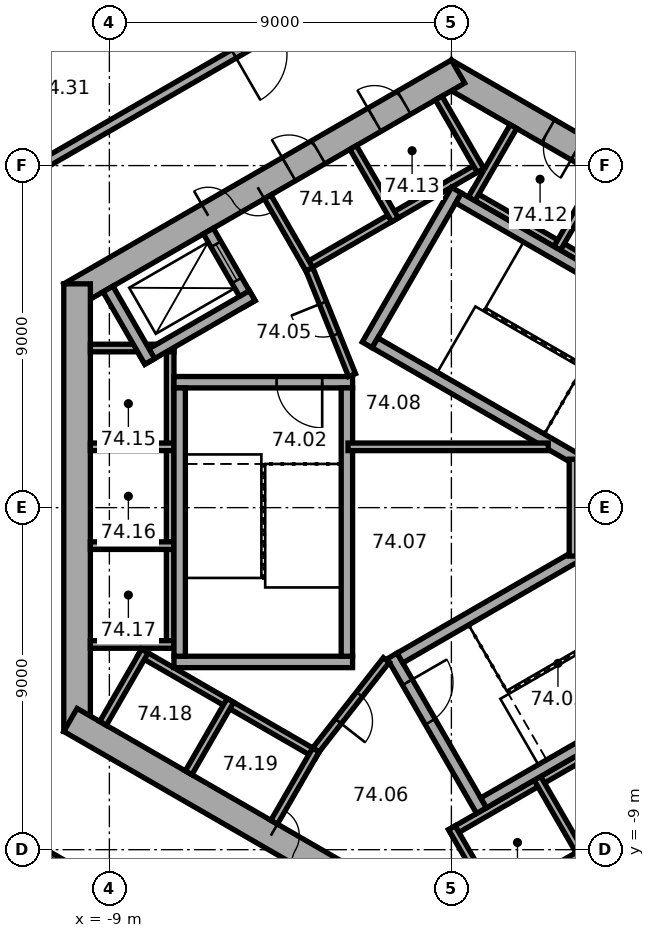
"""IFC4 building model, lengths in metres.
Left out: names, types, materials, properties, quantities, classifications, styles, units other than length and angle.
Written with IfcOpenShell. Run it as: python <this file> out.ifc"""

import sys

from ifc_helpers import new_model, si_unit, direction, frame, frame_2d, origin, place, context, subcontext, project, spatial, rectangle, extrude, element, fill, save


model = new_model("IFC4")
c1 = context("Model", 3, precision=1e-05, world=origin(), true_north=direction((0.0, 1.0)))
c2 = subcontext(c1, "Body", "Model", "MODEL_VIEW")
j1 = project(units=[si_unit("LENGTHUNIT", "METRE"), si_unit("PLANEANGLEUNIT", "RADIAN")], contexts=[c1])
p1 = place(None, origin())
s1 = spatial("IfcSite", under=j1, at=p1, CompositionType="ELEMENT")
p2 = place(p1, origin())
s2 = spatial("IfcBuilding", under=s1, at=p2, CompositionType="ELEMENT")
p3 = place(p2, frame((0.0, 0.0, 300.5)))
s3 = spatial("IfcBuildingStorey", under=s2, at=p3, CompositionType="ELEMENT", Elevation=300.5)
p4 = place(p3, frame((10.025, 5.586, 0.0), z_axis=(0.0, 0.0, 1.0), x_axis=(-0.866026453023, 0.499998182661, 0.0)))
e1 = element("IfcWall", 1, at=p4, inside=s3, PredefinedType="SHEAR", context=c2, shape_type="SweptSolid", body=[
    extrude(rectangle(XDim=11.778, YDim=0.7, at=frame_2d((5.889, 0.0))), origin(), (0.0, 0.0, 1.0), 4.5),
])
p5 = place(p4, frame((3.839, 0.0, 0.0)))
e2 = element("IfcOpeningElement", 2, at=p5, cuts=e1, PredefinedType="OPENING", context=c2, shape_type="SweptSolid", body=[
    extrude(rectangle(XDim=0.9, YDim=2.1, at=frame_2d((0.45, 1.05))), frame((0.0, 0.36, 0.0), z_axis=(0.0, -1.0, 0.0), x_axis=(1.0, 0.0, 0.0)), (0.0, 0.0, 1.0), 0.72),
])
p6 = place(p4, frame((7.739, 0.0, 0.0)))
e3 = element("IfcOpeningElement", 3, at=p6, cuts=e1, PredefinedType="OPENING", context=c2, shape_type="SweptSolid", body=[
    extrude(rectangle(XDim=0.9, YDim=2.1, at=frame_2d((0.45, 1.05))), frame((0.0, 0.36, 0.0), z_axis=(0.0, -1.0, 0.0), x_axis=(1.0, 0.0, 0.0)), (0.0, 0.0, 1.0), 0.72),
])
p7 = place(p3, frame((0.175, 11.475, 0.0), z_axis=(0.0, 0.0, 1.0), x_axis=(-0.866026453023, -0.499998182661, 0.0)))
e4 = element("IfcWall", 4, at=p7, inside=s3, PredefinedType="SHEAR", context=c2, shape_type="SweptSolid", body=[
    extrude(rectangle(XDim=11.778, YDim=0.7, at=frame_2d((5.889, 0.0))), origin(), (0.0, 0.0, 1.0), 4.5),
])
p8 = place(p7, frame((6.089, 0.0, 0.0)))
e5 = element("IfcOpeningElement", 5, at=p8, cuts=e4, PredefinedType="OPENING", context=c2, shape_type="SweptSolid", body=[
    extrude(rectangle(XDim=1.5, YDim=2.1, at=frame_2d((0.75, 1.05))), frame((0.0, 0.36, 0.0), z_axis=(0.0, -1.0, 0.0), x_axis=(1.0, 0.0, 0.0)), (0.0, 0.0, 1.0), 0.72),
])
p9 = place(p7, frame((1.639, 0.0, 0.0)))
e6 = element("IfcOpeningElement", 6, at=p9, cuts=e4, PredefinedType="OPENING", context=c2, shape_type="SweptSolid", body=[
    extrude(rectangle(XDim=0.9, YDim=2.1, at=frame_2d((0.45, 1.05))), frame((0.0, 0.36, 0.0), z_axis=(0.0, -1.0, 0.0), x_axis=(1.0, 0.0, 0.0)), (0.0, 0.0, 1.0), 0.72),
])
p10 = place(p7, frame((4.239, 0.0, 0.0)))
e7 = element("IfcOpeningElement", 7, at=p10, cuts=e4, PredefinedType="OPENING", context=c2, shape_type="SweptSolid", body=[
    extrude(rectangle(XDim=0.9, YDim=2.1, at=frame_2d((0.45, 1.05))), frame((0.0, 0.36, 0.0), z_axis=(0.0, -1.0, 0.0), x_axis=(1.0, 0.0, 0.0)), (0.0, 0.0, 1.0), 0.72),
])
p11 = place(p3, frame((-9.85, 5.889, 0.0), z_axis=(0.0, 0.0, 1.0), x_axis=(0.0, -1.0, 0.0)))
e8 = element("IfcWall", 8, at=p11, inside=s3, PredefinedType="SHEAR", context=c2, shape_type="SweptSolid", body=[
    extrude(rectangle(XDim=11.778, YDim=0.7, at=frame_2d((5.889, 0.0))), origin(), (0.0, 0.0, 1.0), 4.5),
])
p12 = place(p3, frame((-10.025, -5.586, 0.0), z_axis=(0.0, 0.0, 1.0), x_axis=(0.866026453023, -0.499998182661, 0.0)))
e9 = element("IfcWall", 9, at=p12, inside=s3, PredefinedType="SHEAR", context=c2, shape_type="SweptSolid", body=[
    extrude(rectangle(XDim=11.778, YDim=0.7, at=frame_2d((5.889, 0.0))), origin(), (0.0, 0.0, 1.0), 4.5),
])
p13 = place(p12, frame((6.089, 0.0, 0.0)))
e10 = element("IfcOpeningElement", 10, at=p13, cuts=e9, PredefinedType="OPENING", context=c2, shape_type="SweptSolid", body=[
    extrude(rectangle(XDim=1.5, YDim=2.1, at=frame_2d((0.75, 1.05))), frame((0.0, 0.36, 0.0), z_axis=(0.0, -1.0, 0.0), x_axis=(1.0, 0.0, 0.0)), (0.0, 0.0, 1.0), 0.72),
])
p14 = place(p3, frame((-0.175, -11.475, 0.0), z_axis=(0.0, 0.0, 1.0), x_axis=(0.866026453023, 0.499998182661, 0.0)))
e11 = element("IfcWall", 11, at=p14, inside=s3, PredefinedType="SHEAR", context=c2, shape_type="SweptSolid", body=[
    extrude(rectangle(XDim=11.778, YDim=0.7, at=frame_2d((5.889, 0.0))), origin(), (0.0, 0.0, 1.0), 4.5),
])
p15 = place(p14, frame((7.639, 0.0, 0.0)))
e12 = element("IfcOpeningElement", 12, at=p15, cuts=e11, PredefinedType="OPENING", context=c2, shape_type="SweptSolid", body=[
    extrude(rectangle(XDim=1.1, YDim=2.1, at=frame_2d((0.55, 1.05))), frame((0.0, 0.36, 0.0), z_axis=(0.0, -1.0, 0.0), x_axis=(1.0, 0.0, 0.0)), (0.0, 0.0, 1.0), 0.72),
])
p16 = place(p3, frame((-2.624, 20.713, 0.0), z_axis=(0.0, 0.0, 1.0), x_axis=(-0.866026460444, -0.499998169808, 0.0)))
e13 = element("IfcWall", 13, at=p16, inside=s3, PredefinedType="STANDARD", context=c2, shape_type="SweptSolid", body=[
    extrude(rectangle(XDim=17.731, YDim=0.2, at=frame_2d((8.866, 0.0))), origin(), (0.0, 0.0, 1.0), 4.5),
])
p17 = place(p3, frame((7.424, 4.259, 0.0), z_axis=(0.0, 0.0, 1.0), x_axis=(-0.866026010844, 0.49999894854, 0.0)))
e14 = element("IfcWall", 14, at=p17, inside=s3, PredefinedType="PARTITIONING", context=c2, shape_type="SweptSolid", body=[
    extrude(rectangle(XDim=8.0, YDim=0.2, at=frame_2d((4.0, 0.0))), origin(), (0.0, 0.0, 1.0), 4.2),
])
for number, where, z_axis, x_axis in (
    (15, (2.784, 6.822, 0.0), (0.0, 0.0, 1.0), (0.5, 0.866, 0.0)),
    (16, (0.532, 8.122, 0.0), (0.0, 0.0, 1.0), (0.5, 0.866, 0.0)),
):
    element("IfcWall", number, at=place(p3, frame(where, z_axis=z_axis, x_axis=x_axis)), inside=s3, PredefinedType="PARTITIONING", context=c2, shape_type="SweptSolid", body=[
        extrude(rectangle(XDim=2.2, YDim=0.2, at=frame_2d((1.1, 0.0))), origin(), (0.0, 0.0, 1.0), 4.2),
    ])
p18 = place(p3, frame((0.803, 9.009, 0.0), z_axis=(0.0, 0.0, 1.0), x_axis=(-0.866028230842, -0.499995103361, 0.0)))
e17 = element("IfcWall", 17, at=p18, inside=s3, PredefinedType="PARTITIONING", context=c2, shape_type="SweptSolid", body=[
    extrude(rectangle(XDim=5.4, YDim=0.2, at=frame_2d((2.7, 0.0))), origin(), (0.0, 0.0, 1.0), 4.2),
])
p19 = place(p3, frame((0.767, 8.872, 0.0), z_axis=(0.0, 0.0, 1.0), x_axis=(-0.499994660107, 0.866028486751, 0.0)))
e18 = element("IfcWall", 18, at=p19, inside=s3, PredefinedType="PARTITIONING", context=c2, shape_type="SweptSolid", body=[
    extrude(rectangle(XDim=2.2, YDim=0.2, at=frame_2d((1.1, 0.0))), origin(), (0.0, 0.0, 1.0), 4.2),
])
for number, where, z_axis, x_axis in (
    (19, (-1.485, 7.572, 0.0), (0.0, 0.0, 1.0), (-0.5, 0.866, 0.0)),
    (20, (-3.737, 6.272, 0.0), (0.0, 0.0, 1.0), (-0.5, 0.866, 0.0)),
):
    element("IfcWall", number, at=place(p3, frame(where, z_axis=z_axis, x_axis=x_axis)), inside=s3, PredefinedType="PARTITIONING", context=c2, shape_type="SweptSolid", body=[
        extrude(rectangle(XDim=2.2, YDim=0.2, at=frame_2d((1.1, 0.0))), origin(), (0.0, 0.0, 1.0), 4.2),
    ])
p20 = place(p3, frame((-7.4, 4.3, 0.0), z_axis=(0.0, 0.0, 1.0), x_axis=(0.0, -1.0, 0.0)))
e21 = element("IfcWall", 21, at=p20, inside=s3, PredefinedType="PARTITIONING", context=c2, shape_type="SweptSolid", body=[
    extrude(rectangle(XDim=8.0, YDim=0.2, at=frame_2d((4.0, 0.0))), origin(), (0.0, 0.0, 1.0), 4.2),
])
for number, where, z_axis, x_axis in (
    (22, (-7.3, 4.2, 0.0), (0.0, 0.0, 1.0), (-1.0, 0.0, 0.0)),
    (23, (-7.3, 1.6, 0.0), (0.0, 0.0, 1.0), (-1.0, 0.0, 0.0)),
    (24, (-7.3, -1.0, 0.0), (0.0, 0.0, 1.0), (-1.0, 0.0, 0.0)),
    (25, (-7.3, -3.6, 0.0), (0.0, 0.0, 1.0), (-1.0, 0.0, 0.0)),
):
    element("IfcWall", number, at=place(p3, frame(where, z_axis=z_axis, x_axis=x_axis)), inside=s3, PredefinedType="PARTITIONING", context=c2, shape_type="SweptSolid", body=[
        extrude(rectangle(XDim=2.2, YDim=0.2, at=frame_2d((1.1, 0.0))), origin(), (0.0, 0.0, 1.0), 4.2),
    ])
p21 = place(p3, frame((-8.203, -3.809, 0.0), z_axis=(0.0, 0.0, 1.0), x_axis=(0.866028230842, -0.499995103361, 0.0)))
e26 = element("IfcWall", 26, at=p21, inside=s3, PredefinedType="PARTITIONING", context=c2, shape_type="SweptSolid", body=[
    extrude(rectangle(XDim=5.4, YDim=0.2, at=frame_2d((2.7, 0.0))), origin(), (0.0, 0.0, 1.0), 4.2),
])
for number, where, z_axis, x_axis in (
    (27, (-8.067, -3.772, 0.0), (0.0, 0.0, 1.0), (-0.5, -0.866, 0.0)),
    (28, (-5.815, -5.072, 0.0), (0.0, 0.0, 1.0), (-0.5, -0.866, 0.0)),
):
    element("IfcWall", number, at=place(p3, frame(where, z_axis=z_axis, x_axis=x_axis)), inside=s3, PredefinedType="PARTITIONING", context=c2, shape_type="SweptSolid", body=[
        extrude(rectangle(XDim=2.2, YDim=0.2, at=frame_2d((1.1, 0.0))), origin(), (0.0, 0.0, 1.0), 4.2),
    ])
p22 = place(p3, frame((-3.563, -6.372, 0.0), z_axis=(0.0, 0.0, 1.0), x_axis=(-0.499994660107, -0.866028486751, 0.0)))
e29 = element("IfcWall", 29, at=p22, inside=s3, PredefinedType="PARTITIONING", context=c2, shape_type="SweptSolid", body=[
    extrude(rectangle(XDim=2.2, YDim=0.2, at=frame_2d((1.1, 0.0))), origin(), (0.0, 0.0, 1.0), 4.2),
])
p23 = place(p3, frame((-0.024, -8.559, 0.0), z_axis=(0.0, 0.0, 1.0), x_axis=(0.866026010844, 0.49999894854, 0.0)))
e30 = element("IfcWall", 30, at=p23, inside=s3, PredefinedType="PARTITIONING", context=c2, shape_type="SweptSolid", body=[
    extrude(rectangle(XDim=8.0, YDim=0.2, at=frame_2d((4.0, 0.0))), origin(), (0.0, 0.0, 1.0), 4.2),
])
for number, where, z_axis, x_axis in (
    (31, (0.013, -8.422, 0.0), (0.0, 0.0, 1.0), (0.5, -0.866, 0.0)),
    (32, (2.264, -7.122, 0.0), (0.0, 0.0, 1.0), (0.5, -0.866, 0.0)),
):
    element("IfcWall", number, at=place(p3, frame(where, z_axis=z_axis, x_axis=x_axis)), inside=s3, PredefinedType="PARTITIONING", context=c2, shape_type="SweptSolid", body=[
        extrude(rectangle(XDim=2.2, YDim=0.2, at=frame_2d((1.1, 0.0))), origin(), (0.0, 0.0, 1.0), 4.2),
    ])
p24 = place(p3, frame((-2.216, 4.282, 0.0), z_axis=(0.0, 0.0, 1.0), x_axis=(0.499977259774, 0.866038532462, 0.0)))
e33 = element("IfcWall", 33, at=p24, inside=s3, PredefinedType="SHEAR", context=c2, shape_type="SweptSolid", body=[
    extrude(rectangle(XDim=4.7, YDim=0.3, at=frame_2d((2.35, 0.0))), origin(), (0.0, 0.0, 1.0), 4.5),
])
for number, where, z_axis, x_axis in (
    (34, (4.103, 0.807, 0.0), (0.0, 0.0, 1.0), (-0.866, 0.5, 0.0)),
    (35, (6.303, 4.617, 0.0), (0.0, 0.0, 1.0), (-0.866, 0.5, 0.0)),
):
    element("IfcWall", number, at=place(p3, frame(where, z_axis=z_axis, x_axis=x_axis)), inside=s3, PredefinedType="SHEAR", context=c2, shape_type="SweptSolid", body=[
        extrude(rectangle(XDim=7.06, YDim=0.3, at=frame_2d((3.53, 0.0))), origin(), (0.0, 0.0, 1.0), 4.5),
    ])
p25 = place(p3, frame((-2.6, 3.3, 0.0), z_axis=(0.0, 0.0, 1.0), x_axis=(-1.0, 0.0, 0.0)))
e36 = element("IfcWall", 36, at=p25, inside=s3, PredefinedType="SHEAR", context=c2, shape_type="SweptSolid", body=[
    extrude(rectangle(XDim=4.7, YDim=0.3, at=frame_2d((2.35, 0.0))), origin(), (0.0, 0.0, 1.0), 4.5),
])
p26 = place(p25, frame((0.8, 0.0, 0.0)))
e37 = element("IfcOpeningElement", 37, at=p26, cuts=e36, PredefinedType="OPENING", context=c2, shape_type="SweptSolid", body=[
    extrude(rectangle(XDim=1.2, YDim=2.1, at=frame_2d((0.6, 1.05))), frame((0.0, 0.16, 0.0), z_axis=(0.0, -1.0, 0.0), x_axis=(1.0, 0.0, 0.0)), (0.0, 0.0, 1.0), 0.32),
])
p27 = place(p3, frame((-2.6, -4.06, 0.0), z_axis=(0.0, 0.0, 1.0), x_axis=(-1.0, 0.0, 0.0)))
e38 = element("IfcWall", 38, at=p27, inside=s3, PredefinedType="SHEAR", context=c2, shape_type="SweptSolid", body=[
    extrude(rectangle(XDim=4.7, YDim=0.3, at=frame_2d((2.35, 0.0))), origin(), (0.0, 0.0, 1.0), 4.5),
])
for number, where, z_axis, x_axis in (
    (39, (-2.75, 3.15, 0.0), (0.0, 0.0, 1.0), (0.0, -1.0, 0.0)),
    (40, (-7.15, 3.15, 0.0), (0.0, 0.0, 1.0), (0.0, -1.0, 0.0)),
):
    element("IfcWall", number, at=place(p3, frame(where, z_axis=z_axis, x_axis=x_axis)), inside=s3, PredefinedType="SHEAR", context=c2, shape_type="SweptSolid", body=[
        extrude(rectangle(XDim=7.06, YDim=0.3, at=frame_2d((3.53, 0.0))), origin(), (0.0, 0.0, 1.0), 4.5),
    ])
p28 = place(p3, frame((-1.558, -3.902, 0.0), z_axis=(0.0, 0.0, 1.0), x_axis=(0.499977259774, -0.866038532462, 0.0)))
e41 = element("IfcWall", 41, at=p28, inside=s3, PredefinedType="SHEAR", context=c2, shape_type="SweptSolid", body=[
    extrude(rectangle(XDim=4.7, YDim=0.3, at=frame_2d((2.35, 0.0))), origin(), (0.0, 0.0, 1.0), 4.5),
])
p29 = place(p28, frame((0.8, 0.0, 0.0)))
e42 = element("IfcOpeningElement", 42, at=p29, cuts=e41, PredefinedType="OPENING", context=c2, shape_type="SweptSolid", body=[
    extrude(rectangle(XDim=1.2, YDim=2.1, at=frame_2d((0.6, 1.05))), frame((0.0, 0.16, 0.0), z_axis=(0.0, -1.0, 0.0), x_axis=(1.0, 0.0, 0.0)), (0.0, 0.0, 1.0), 0.32),
])
for number, where, z_axis, x_axis in (
    (43, (-1.353, -3.957, 0.0), (0.0, 0.0, 1.0), (0.866, 0.5, 0.0)),
    (44, (0.847, -7.767, 0.0), (0.0, 0.0, 1.0), (0.866, 0.5, 0.0)),
):
    element("IfcWall", number, at=place(p3, frame(where, z_axis=z_axis, x_axis=x_axis)), inside=s3, PredefinedType="SHEAR", context=c2, shape_type="SweptSolid", body=[
        extrude(rectangle(XDim=7.06, YDim=0.3, at=frame_2d((3.53, 0.0))), origin(), (0.0, 0.0, 1.0), 4.5),
    ])
p30 = place(p3, frame((-5.295, 5.372, 0.0), z_axis=(0.0, 0.0, 1.0), x_axis=(-0.500077893725, 0.86598042715, 0.0)))
e45 = element("IfcWall", 45, at=p30, inside=s3, PredefinedType="SHEAR", context=c2, shape_type="SweptSolid", body=[
    extrude(rectangle(XDim=2.2, YDim=0.3, at=frame_2d((1.1, 0.0))), origin(), (0.0, 0.0, 1.0), 4.2),
])
p31 = place(p30, frame((0.7, 0.0, 0.0)))
e46 = element("IfcOpeningElement", 46, at=p31, cuts=e45, PredefinedType="OPENING", context=c2, shape_type="SweptSolid", body=[
    extrude(rectangle(XDim=1.1, YDim=2.1, at=frame_2d((0.55, 1.05))), frame((0.0, 0.16, 0.0), z_axis=(0.0, -1.0, 0.0), x_axis=(1.0, 0.0, 0.0)), (0.0, 0.0, 1.0), 0.32),
])
p32 = place(p3, frame((-5.24, 5.577, 0.0), z_axis=(0.0, 0.0, 1.0), x_axis=(-0.866014461049, -0.500018952895, 0.0)))
e47 = element("IfcWall", 47, at=p32, inside=s3, PredefinedType="SHEAR", context=c2, shape_type="SweptSolid", body=[
    extrude(rectangle(XDim=3.35, YDim=0.3, at=frame_2d((1.675, 0.0))), origin(), (0.0, 0.0, 1.0), 4.2),
])
p33 = place(p3, frame((-7.937, 3.847, 0.0), z_axis=(0.0, 0.0, 1.0), x_axis=(-0.50002983664, 0.866008176907, 0.0)))
e48 = element("IfcWall", 48, at=p33, inside=s3, PredefinedType="SHEAR", context=c2, shape_type="SweptSolid", body=[
    extrude(rectangle(XDim=2.2, YDim=0.3, at=frame_2d((1.1, 0.0))), origin(), (0.0, 0.0, 1.0), 4.2),
])
p34 = place(p3, frame((-2.615, 3.487, 0.0), z_axis=(0.0, 0.0, 1.0), x_axis=(-0.373576831041, 0.92759924068, 0.0)))
e49 = element("IfcWall", 49, at=p34, inside=s3, PredefinedType="PARTITIONING", context=c2, shape_type="SweptSolid", body=[
    extrude(rectangle(XDim=3.002, YDim=0.2, at=frame_2d((1.501, 0.0))), origin(), (0.0, 0.0, 1.0), 4.2),
])
p35 = place(p34, frame((1.15, 0.0, 0.0)))
e50 = element("IfcOpeningElement", 50, at=p35, cuts=e49, PredefinedType="OPENING", context=c2, shape_type="SweptSolid", body=[
    extrude(rectangle(XDim=0.9, YDim=2.1, at=frame_2d((0.45, 1.05))), frame((0.0, 0.11, 0.0), z_axis=(0.0, -1.0, 0.0), x_axis=(1.0, 0.0, 0.0)), (0.0, 0.0, 1.0), 0.22),
])
p36 = place(p3, frame((-1.712, -4.008, 0.0), z_axis=(0.0, 0.0, 1.0), x_axis=(-0.616549420702, -0.787316208287, 0.0)))
e51 = element("IfcWall", 51, at=p36, inside=s3, PredefinedType="PARTITIONING", context=c2, shape_type="SweptSolid", body=[
    extrude(rectangle(XDim=3.002, YDim=0.2, at=frame_2d((1.501, 0.0))), origin(), (0.0, 0.0, 1.0), 4.2),
])
p37 = place(p36, frame((1.15, 0.0, 0.0)))
e52 = element("IfcOpeningElement", 52, at=p37, cuts=e51, PredefinedType="OPENING", context=c2, shape_type="SweptSolid", body=[
    extrude(rectangle(XDim=0.9, YDim=2.1, at=frame_2d((0.45, 1.05))), frame((0.0, 0.11, 0.0), z_axis=(0.0, -1.0, 0.0), x_axis=(1.0, 0.0, 0.0)), (0.0, 0.0, 1.0), 0.22),
])
p38 = place(p3, frame((-2.72, 1.6, 0.0), z_axis=(0.0, 0.0, 1.0), x_axis=(1.0, 0.0, 0.0)))
e53 = element("IfcWall", 53, at=p38, inside=s3, PredefinedType="PARTITIONING", context=c2, shape_type="SweptSolid", body=[
    extrude(rectangle(XDim=5.269, YDim=0.2, at=frame_2d((2.634, 0.0))), origin(), (0.0, 0.0, 1.0), 4.2),
])
p39 = place(p3, frame((3.2, -1.275, 0.0), z_axis=(0.0, 0.0, 1.0), x_axis=(0.0, 1.0, 0.0)))
e54 = element("IfcWall", 54, at=p39, inside=s3, PredefinedType="PARTITIONING", context=c2, shape_type="SweptSolid", body=[
    extrude(rectangle(XDim=2.549, YDim=0.2, at=frame_2d((1.275, 0.0))), origin(), (0.0, 0.0, 1.0), 4.2),
])
p40 = place(p3, frame((-13.148, -7.651, 0.0), z_axis=(0.0, 0.0, 1.0), x_axis=(0.866016920268, -0.500014693593, 0.0)))
e55 = element("IfcWall", 55, at=p40, inside=s3, PredefinedType="PARTITIONING", context=c2, shape_type="SweptSolid", body=[
    extrude(rectangle(XDim=9.16, YDim=0.15, at=frame_2d((4.58, 0.0))), origin(), (0.0, 0.0, 1.0), 4.2),
])
p41 = place(p40, frame((0.55, 0.0, 0.0)))
e56 = element("IfcOpeningElement", 56, at=p41, cuts=e55, PredefinedType="OPENING", context=c2, shape_type="SweptSolid", body=[
    extrude(rectangle(XDim=1.0, YDim=2.1, at=frame_2d((0.5, 1.05))), frame((0.0, 0.085, 0.0), z_axis=(0.0, -1.0, 0.0), x_axis=(1.0, 0.0, 0.0)), (0.0, 0.0, 1.0), 0.17),
])
p42 = place(p3, frame((-12.14, 8.233, 0.0), z_axis=(0.0, 0.0, 1.0), x_axis=(0.866012216201, 0.500022840869, 0.0)))
e57 = element("IfcWall", 57, at=p42, inside=s3, PredefinedType="SOLIDWALL", context=c2, shape_type="SweptSolid", body=[
    extrude(rectangle(XDim=9.357, YDim=0.25, at=frame_2d((4.678, 0.0))), origin(), (0.0, 0.0, 1.0), 4.2),
])
p43 = place(p42, frame((7.407, 0.0, 0.0)))
e58 = element("IfcOpeningElement", 58, at=p43, cuts=e57, PredefinedType="OPENING", context=c2, shape_type="SweptSolid", body=[
    extrude(rectangle(XDim=1.4, YDim=2.1, at=frame_2d((0.7, 1.05))), frame((0.0, 0.135, 0.0), z_axis=(0.0, -1.0, 0.0), x_axis=(1.0, 0.0, 0.0)), (0.0, 0.0, 1.0), 0.27),
])
p44 = place(p3, frame((-16.187, 10.977, 0.0), z_axis=(0.0, 0.0, 1.0), x_axis=(0.866022320763, 0.500005339912, 0.0)))
e59 = element("IfcWall", 59, at=p44, inside=s3, PredefinedType="SOLIDWALL", context=c2, shape_type="SweptSolid", body=[
    extrude(rectangle(XDim=12.476, YDim=0.25, at=frame_2d((6.238, 0.0))), origin(), (0.0, 0.0, 1.0), 4.2),
])
p45 = place(p8, origin())
e60 = element("IfcDoor", 60, at=p45, inside=s3, OperationType="DOUBLE_DOOR_SINGLE_SWING", PredefinedType="DOOR", context=c2, shape_type="SweptSolid", body=[
    extrude(rectangle(XDim=1.5, YDim=2.1, at=frame_2d((0.75, 1.05))), frame((0.0, 0.025, 0.0), z_axis=(0.0, -1.0, 0.0), x_axis=(1.0, 0.0, 0.0)), (0.0, 0.0, 1.0), 0.05),
])
fill(e5, e60)
p46 = place(p13, origin())
e61 = element("IfcDoor", 61, at=p46, inside=s3, OperationType="DOUBLE_DOOR_SINGLE_SWING", PredefinedType="DOOR", context=c2, shape_type="SweptSolid", body=[
    extrude(rectangle(XDim=1.5, YDim=2.1, at=frame_2d((0.75, 1.05))), frame((0.0, 0.025, 0.0), z_axis=(0.0, -1.0, 0.0), x_axis=(1.0, 0.0, 0.0)), (0.0, 0.0, 1.0), 0.05),
])
fill(e10, e61)
p47 = place(p26, origin())
e62 = element("IfcDoor", 62, at=p47, inside=s3, OperationType="SINGLE_SWING_RIGHT", PredefinedType="DOOR", context=c2, shape_type="SweptSolid", body=[
    extrude(rectangle(XDim=1.2, YDim=2.1, at=frame_2d((0.6, 1.05))), frame((0.0, 0.025, 0.0), z_axis=(0.0, -1.0, 0.0), x_axis=(1.0, 0.0, 0.0)), (0.0, 0.0, 1.0), 0.05),
])
fill(e37, e62)
p48 = place(p29, origin())
e63 = element("IfcDoor", 63, at=p48, inside=s3, OperationType="SINGLE_SWING_RIGHT", PredefinedType="DOOR", context=c2, shape_type="SweptSolid", body=[
    extrude(rectangle(XDim=1.2, YDim=2.1, at=frame_2d((0.6, 1.05))), frame((0.0, 0.025, 0.0), z_axis=(0.0, -1.0, 0.0), x_axis=(1.0, 0.0, 0.0)), (0.0, 0.0, 1.0), 0.05),
])
fill(e42, e63)
p49 = place(p35, origin())
e64 = element("IfcDoor", 64, at=p49, inside=s3, OperationType="SINGLE_SWING_LEFT", PredefinedType="DOOR", context=c2, shape_type="SweptSolid", body=[
    extrude(rectangle(XDim=0.9, YDim=2.1, at=frame_2d((0.45, 1.05))), frame((0.0, 0.025, 0.0), z_axis=(0.0, -1.0, 0.0), x_axis=(1.0, 0.0, 0.0)), (0.0, 0.0, 1.0), 0.05),
])
fill(e50, e64)
p50 = place(p37, origin())
e65 = element("IfcDoor", 65, at=p50, inside=s3, OperationType="SINGLE_SWING_LEFT", PredefinedType="DOOR", context=c2, shape_type="SweptSolid", body=[
    extrude(rectangle(XDim=0.9, YDim=2.1, at=frame_2d((0.45, 1.05))), frame((0.0, 0.025, 0.0), z_axis=(0.0, -1.0, 0.0), x_axis=(1.0, 0.0, 0.0)), (0.0, 0.0, 1.0), 0.05),
])
fill(e52, e65)
p51 = place(p6, origin())
e66 = element("IfcDoor", 66, at=p51, inside=s3, OperationType="SINGLE_SWING_LEFT", PredefinedType="DOOR", context=c2, shape_type="SweptSolid", body=[
    extrude(rectangle(XDim=0.9, YDim=2.1, at=frame_2d((0.45, 1.05))), frame((0.0, 0.025, 0.0), z_axis=(0.0, -1.0, 0.0), x_axis=(1.0, 0.0, 0.0)), (0.0, 0.0, 1.0), 0.05),
])
fill(e3, e66)
p52 = place(p9, origin())
e67 = element("IfcDoor", 67, at=p52, inside=s3, OperationType="SINGLE_SWING_LEFT", PredefinedType="DOOR", context=c2, shape_type="SweptSolid", body=[
    extrude(rectangle(XDim=0.9, YDim=2.1, at=frame_2d((0.45, 1.05))), frame((0.0, 0.025, 0.0), z_axis=(0.0, -1.0, 0.0), x_axis=(1.0, 0.0, 0.0)), (0.0, 0.0, 1.0), 0.05),
])
fill(e6, e67)
p53 = place(p10, origin())
e68 = element("IfcDoor", 68, at=p53, inside=s3, OperationType="SINGLE_SWING_LEFT", PredefinedType="DOOR", context=c2, shape_type="SweptSolid", body=[
    extrude(rectangle(XDim=0.9, YDim=2.1, at=frame_2d((0.45, 1.05))), frame((0.0, 0.025, 0.0), z_axis=(0.0, -1.0, 0.0), x_axis=(1.0, 0.0, 0.0)), (0.0, 0.0, 1.0), 0.05),
])
fill(e7, e68)
p54 = place(p31, origin())
e69 = element("IfcDoor", 69, at=p54, inside=s3, OperationType="DOUBLE_DOOR_SLIDING", PredefinedType="DOOR", context=c2, shape_type="SweptSolid", body=[
    extrude(rectangle(XDim=1.1, YDim=2.1, at=frame_2d((0.55, 1.05))), frame((0.0, 0.025, 0.0), z_axis=(0.0, -1.0, 0.0), x_axis=(1.0, 0.0, 0.0)), (0.0, 0.0, 1.0), 0.05),
])
fill(e46, e69)
p55 = place(p43, origin())
e70 = element("IfcDoor", 70, at=p55, inside=s3, OperationType="SINGLE_SWING_LEFT", PredefinedType="DOOR", context=c2, shape_type="SweptSolid", body=[
    extrude(rectangle(XDim=1.4, YDim=2.1, at=frame_2d((0.7, 1.05))), frame((0.0, 0.025, 0.0), z_axis=(0.0, -1.0, 0.0), x_axis=(1.0, 0.0, 0.0)), (0.0, 0.0, 1.0), 0.05),
])
fill(e58, e70)
save(model, sys.argv[1])
